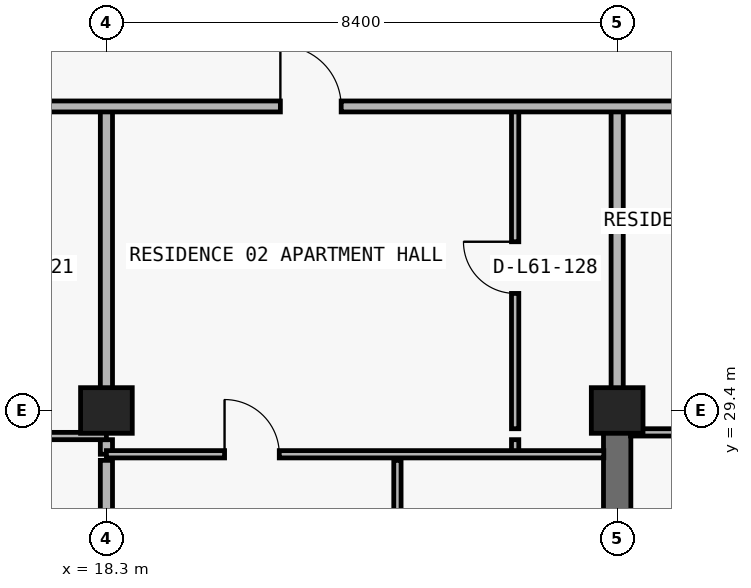
"""IFC4 building model, lengths in metres.
Left out: names, types, materials, properties, quantities, classifications, styles, units other than length and angle.
Written with IfcOpenShell. Run it as: python <this file> out.ifc"""

import sys

from ifc_helpers import new_model, si_unit, direction, frame, frame_2d, origin, origin_2d, place, context, subcontext, project, spatial, rectangle, extrude, element, fill, save


model = new_model("IFC4")
c1 = context("Model", 3, precision=1e-05, world=origin(), true_north=direction((0.0, 1.0)))
c2 = subcontext(c1, "Body", "Model", "MODEL_VIEW")
j1 = project(units=[si_unit("LENGTHUNIT", "METRE"), si_unit("PLANEANGLEUNIT", "RADIAN")], contexts=[c1])
p1 = place(None, origin())
s1 = spatial("IfcSite", under=j1, at=p1, CompositionType="ELEMENT")
p2 = place(p1, origin())
s2 = spatial("IfcBuilding", under=s1, at=p2, CompositionType="ELEMENT")
p3 = place(p2, frame((0.0, 0.0, 218.1)))
s3 = spatial("IfcBuildingStorey", under=s2, at=p3, CompositionType="ELEMENT", Elevation=218.1)
for number, where, z_axis, x_axis in (
    (1, (18.3, 29.4, 0.0), (0.0, 0.0, 1.0), (1.0, 0.0, 0.0)),
    (2, (26.7, 29.4, 0.0), (0.0, 0.0, 1.0), (1.0, 0.0, 0.0)),
):
    element("IfcColumn", number, at=place(p3, frame(where, z_axis=z_axis, x_axis=x_axis)), inside=s3, PredefinedType="COLUMN", context=c2, shape_type="SweptSolid", body=[
        extrude(rectangle(XDim=0.85, YDim=0.75, at=origin_2d()), origin(), (0.0, 0.0, 1.0), 3.0),
    ])
p4 = place(p3, frame((26.7, 20.8, 0.0), z_axis=(0.0, 0.0, 1.0), x_axis=(0.0, 1.0, 0.0)))
e3 = element("IfcWall", 3, at=p4, inside=s3, PredefinedType="SHEAR", context=c2, shape_type="SweptSolid", body=[
    extrude(rectangle(XDim=8.6, YDim=0.45, at=frame_2d((4.3, 0.0))), origin(), (0.0, 0.0, 1.0), 3.0),
])
p5 = place(p3, frame((18.3, 23.89, 0.0), z_axis=(0.0, 0.0, 1.0), x_axis=(0.0, 1.0, 0.0)))
e4 = element("IfcWall", 4, at=p5, inside=s3, PredefinedType="PARTITIONING", context=c2, shape_type="SweptSolid", body=[
    extrude(rectangle(XDim=4.69, YDim=0.2, at=frame_2d((2.345, 0.0))), origin(), (0.0, 0.0, 1.0), 2.213),
])
p6 = place(p3, frame((18.3, 28.68, 0.0), z_axis=(0.0, 0.0, 1.0), x_axis=(0.0, 1.0, 0.0)))
e5 = element("IfcWall", 5, at=p6, inside=s3, PredefinedType="PARTITIONING", context=c2, shape_type="SweptSolid", body=[
    extrude(rectangle(XDim=0.24, YDim=0.2, at=frame_2d((0.12, 0.0))), origin(), (0.0, 0.0, 1.0), 2.213),
])
p7 = place(p3, frame((18.3, 29.1, 0.0), z_axis=(0.0, 0.0, 1.0), x_axis=(0.0, 1.0, 0.0)))
e6 = element("IfcWall", 6, at=p7, inside=s3, PredefinedType="PARTITIONING", context=c2, shape_type="SweptSolid", body=[
    extrude(rectangle(XDim=5.3, YDim=0.2, at=frame_2d((2.65, 0.0))), origin(), (0.0, 0.0, 1.0), 2.213),
])
p8 = place(p3, frame((23.086, 23.89, 0.0), z_axis=(0.0, 0.0, 1.0), x_axis=(0.0, 1.0, 0.0)))
e7 = element("IfcWall", 7, at=p8, inside=s3, PredefinedType="PARTITIONING", context=c2, shape_type="SweptSolid", body=[
    extrude(rectangle(XDim=4.69, YDim=0.12, at=frame_2d((2.345, 0.0))), origin(), (0.0, 0.0, 1.0), 3.0),
])
p9 = place(p8, frame((1.895, 0.0, 0.0)))
e8 = element("IfcOpeningElement", 8, at=p9, cuts=e7, PredefinedType="OPENING", context=c2, shape_type="SweptSolid", body=[
    extrude(rectangle(XDim=0.9, YDim=2.15, at=frame_2d((0.45, 1.075))), frame((0.0, 0.07, 0.0), z_axis=(0.0, -1.0, 0.0), x_axis=(1.0, 0.0, 0.0)), (0.0, 0.0, 1.0), 0.14),
])
p10 = place(p3, frame((25.022, 28.68, 0.0), z_axis=(0.0, 0.0, 1.0), x_axis=(0.0, 1.0, 0.0)))
e9 = element("IfcWall", 9, at=p10, inside=s3, PredefinedType="PARTITIONING", context=c2, shape_type="SweptSolid", body=[
    extrude(rectangle(XDim=0.24, YDim=0.12, at=frame_2d((0.12, 0.0))), origin(), (0.0, 0.0, 1.0), 3.0),
])
p11 = place(p3, frame((25.022, 29.1, 0.0), z_axis=(0.0, 0.0, 1.0), x_axis=(0.0, 1.0, 0.0)))
e10 = element("IfcWall", 10, at=p11, inside=s3, PredefinedType="PARTITIONING", context=c2, shape_type="SweptSolid", body=[
    extrude(rectangle(XDim=5.3, YDim=0.12, at=frame_2d((2.65, 0.0))), origin(), (0.0, 0.0, 1.0), 3.0),
])
p12 = place(p11, frame((2.225, 0.0, 0.0)))
e11 = element("IfcOpeningElement", 11, at=p12, cuts=e10, PredefinedType="OPENING", context=c2, shape_type="SweptSolid", body=[
    extrude(rectangle(XDim=0.85, YDim=2.1, at=frame_2d((0.425, 1.05))), frame((0.0, 0.07, 0.0), z_axis=(0.0, -1.0, 0.0), x_axis=(1.0, 0.0, 0.0)), (0.0, 0.0, 1.0), 0.14),
])
p13 = place(p3, frame((26.7, 29.405, 0.0), z_axis=(0.0, 0.0, 1.0), x_axis=(0.0, 1.0, 0.0)))
e12 = element("IfcWall", 12, at=p13, inside=s3, PredefinedType="PARTITIONING", context=c2, shape_type="SweptSolid", body=[
    extrude(rectangle(XDim=4.995, YDim=0.2, at=frame_2d((2.498, 0.0))), origin(), (0.0, 0.0, 1.0), 2.285),
])
p14 = place(p3, frame((18.3, 28.68, 0.0), z_axis=(0.0, 0.0, 1.0), x_axis=(1.0, 0.0, 0.0)))
e13 = element("IfcWall", 13, at=p14, inside=s3, PredefinedType="PARTITIONING", context=c2, shape_type="SweptSolid", body=[
    extrude(rectangle(XDim=8.18, YDim=0.12, at=frame_2d((4.09, 0.0))), origin(), (0.0, 0.0, 1.0), 3.0),
])
p15 = place(p14, frame((1.943, 0.0, 0.0)))
e14 = element("IfcOpeningElement", 14, at=p15, cuts=e13, PredefinedType="OPENING", context=c2, shape_type="SweptSolid", body=[
    extrude(rectangle(XDim=0.9, YDim=2.15, at=frame_2d((0.45, 1.075))), frame((0.0, 0.07, 0.0), z_axis=(0.0, -1.0, 0.0), x_axis=(1.0, 0.0, 0.0)), (0.0, 0.0, 1.0), 0.14),
])
p16 = place(p3, frame((10.1, 28.98, 0.0), z_axis=(0.0, 0.0, 1.0), x_axis=(1.0, 0.0, 0.0)))
e15 = element("IfcWall", 15, at=p16, inside=s3, PredefinedType="PARTITIONING", context=c2, shape_type="SweptSolid", body=[
    extrude(rectangle(XDim=8.2, YDim=0.12, at=frame_2d((4.1, 0.0))), origin(), (0.0, 0.0, 1.0), 3.0),
])
p17 = place(p16, frame((1.764, 0.0, 0.0)))
e16 = element("IfcOpeningElement", 16, at=p17, cuts=e15, PredefinedType="OPENING", context=c2, shape_type="SweptSolid", body=[
    extrude(rectangle(XDim=0.9, YDim=2.15, at=frame_2d((0.45, 1.075))), frame((0.0, 0.07, 0.0), z_axis=(0.0, -1.0, 0.0), x_axis=(1.0, 0.0, 0.0)), (0.0, 0.0, 1.0), 0.14),
])
p18 = place(p3, frame((26.92, 29.04, 0.0), z_axis=(0.0, 0.0, 1.0), x_axis=(1.0, 0.0, 0.0)))
e17 = element("IfcWall", 17, at=p18, inside=s3, PredefinedType="PARTITIONING", context=c2, shape_type="SweptSolid", body=[
    extrude(rectangle(XDim=8.18, YDim=0.12, at=frame_2d((4.09, 0.0))), origin(), (0.0, 0.0, 1.0), 3.0),
])
p19 = place(p18, frame((1.583, 0.0, 0.0)))
e18 = element("IfcOpeningElement", 18, at=p19, cuts=e17, PredefinedType="OPENING", context=c2, shape_type="SweptSolid", body=[
    extrude(rectangle(XDim=0.9, YDim=2.15, at=frame_2d((0.45, 1.075))), frame((0.0, 0.07, 0.0), z_axis=(0.0, -1.0, 0.0), x_axis=(1.0, 0.0, 0.0)), (0.0, 0.0, 1.0), 0.14),
])
p20 = place(p3, frame((10.105, 34.4, 0.0), z_axis=(0.0, 0.0, 1.0), x_axis=(1.0, 0.0, 0.0)))
e19 = element("IfcWall", 19, at=p20, inside=s3, PredefinedType="PARTITIONING", context=c2, shape_type="SweptSolid", body=[
    extrude(rectangle(XDim=29.099, YDim=0.18, at=frame_2d((14.55, 0.0))), origin(), (0.0, 0.0, 1.0), 3.0),
])
p21 = place(p20, frame((2.647, 0.0, 0.0)))
e20 = element("IfcOpeningElement", 20, at=p21, cuts=e19, PredefinedType="OPENING", context=c2, shape_type="SweptSolid", body=[
    extrude(rectangle(XDim=1.0, YDim=2.2, at=frame_2d((0.5, 1.1))), frame((0.0, 0.1, 0.0), z_axis=(0.0, -1.0, 0.0), x_axis=(1.0, 0.0, 0.0)), (0.0, 0.0, 1.0), 0.2),
])
p22 = place(p20, frame((11.056, 0.0, 0.0)))
e21 = element("IfcOpeningElement", 21, at=p22, cuts=e19, PredefinedType="OPENING", context=c2, shape_type="SweptSolid", body=[
    extrude(rectangle(XDim=1.0, YDim=2.2, at=frame_2d((0.5, 1.1))), frame((0.0, 0.1, 0.0), z_axis=(0.0, -1.0, 0.0), x_axis=(1.0, 0.0, 0.0)), (0.0, 0.0, 1.0), 0.2),
])
p23 = place(p20, frame((19.334, 0.0, 0.0)))
e22 = element("IfcOpeningElement", 22, at=p23, cuts=e19, PredefinedType="OPENING", context=c2, shape_type="SweptSolid", body=[
    extrude(rectangle(XDim=1.0, YDim=2.2, at=frame_2d((0.5, 1.1))), frame((0.0, 0.1, 0.0), z_axis=(0.0, -1.0, 0.0), x_axis=(1.0, 0.0, 0.0)), (0.0, 0.0, 1.0), 0.2),
])
p24 = place(p20, frame((26.547, 0.0, 0.0)))
e23 = element("IfcOpeningElement", 23, at=p24, cuts=e19, PredefinedType="OPENING", context=c2, shape_type="SweptSolid", body=[
    extrude(rectangle(XDim=1.0, YDim=2.2, at=frame_2d((0.5, 1.1))), frame((0.0, 0.1, 0.0), z_axis=(0.0, -1.0, 0.0), x_axis=(1.0, 0.0, 0.0)), (0.0, 0.0, 1.0), 0.2),
])
p25 = place(p22, origin())
e24 = element("IfcDoor", 24, at=p25, inside=s3, OperationType="SINGLE_SWING_LEFT", PredefinedType="DOOR", context=c2, shape_type="SweptSolid", body=[
    extrude(rectangle(XDim=1.0, YDim=2.2, at=frame_2d((0.5, 1.1))), frame((0.0, 0.025, 0.0), z_axis=(0.0, -1.0, 0.0), x_axis=(1.0, 0.0, 0.0)), (0.0, 0.0, 1.0), 0.05),
])
fill(e21, e24)
p26 = place(p12, origin())
e25 = element("IfcDoor", 25, at=p26, inside=s3, OperationType="SINGLE_SWING_RIGHT", PredefinedType="DOOR", context=c2, shape_type="SweptSolid", body=[
    extrude(rectangle(XDim=0.85, YDim=2.1, at=frame_2d((0.425, 1.05))), frame((0.0, 0.025, 0.0), z_axis=(0.0, -1.0, 0.0), x_axis=(1.0, 0.0, 0.0)), (0.0, 0.0, 1.0), 0.05),
])
fill(e11, e25)
p27 = place(p15, origin())
e26 = element("IfcDoor", 26, at=p27, inside=s3, OperationType="SINGLE_SWING_LEFT", PredefinedType="DOOR", context=c2, shape_type="SweptSolid", body=[
    extrude(rectangle(XDim=0.9, YDim=2.15, at=frame_2d((0.45, 1.075))), frame((0.0, 0.025, 0.0), z_axis=(0.0, -1.0, 0.0), x_axis=(1.0, 0.0, 0.0)), (0.0, 0.0, 1.0), 0.05),
])
fill(e14, e26)
save(model, sys.argv[1])
